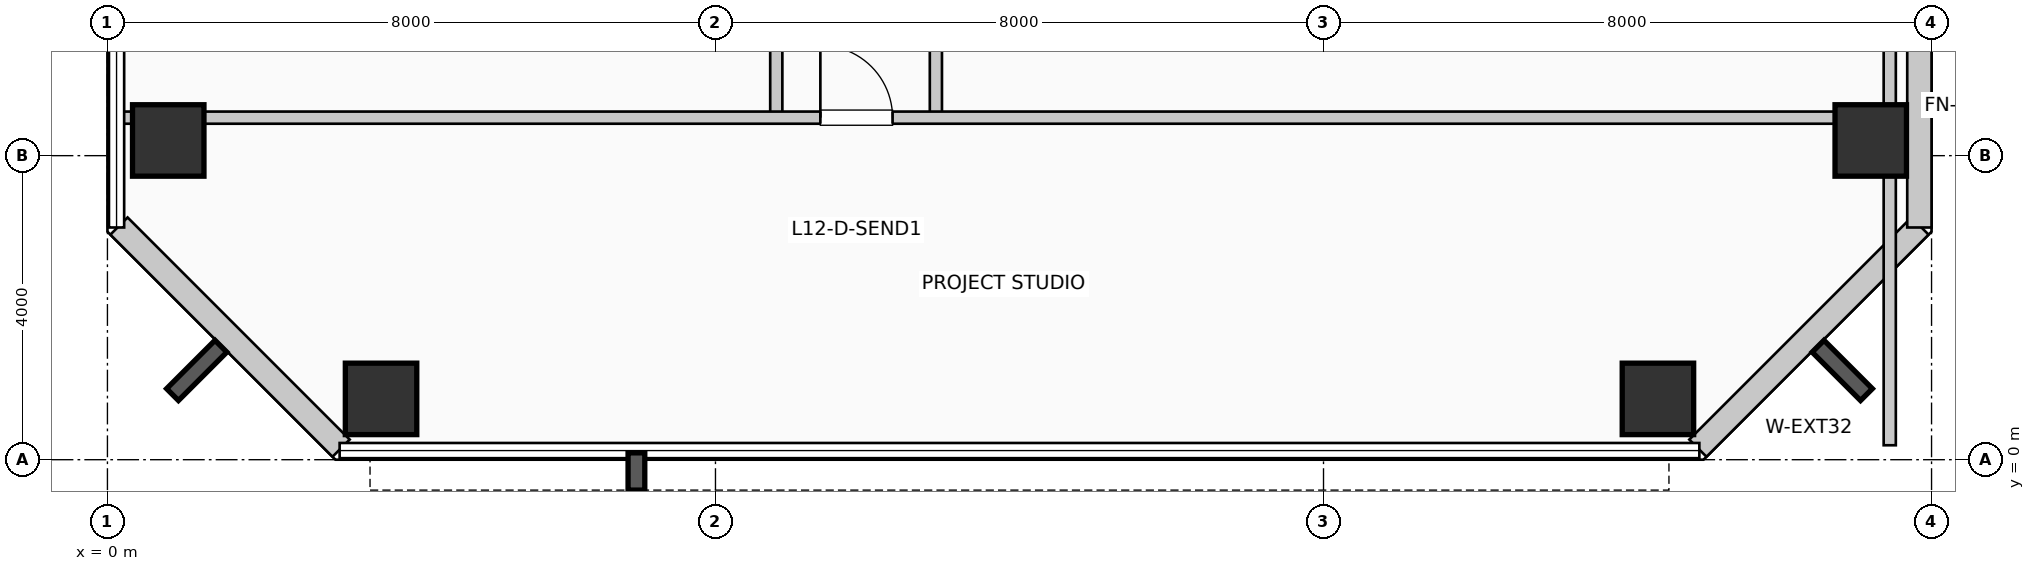
"""IFC4 building model, lengths in metres.
Left out: names, types, materials, properties, quantities, classifications, styles, units other than length and angle.
Written with IfcOpenShell. Run it as: python <this file> out.ifc"""

import sys

from ifc_helpers import new_model, si_unit, direction, frame, frame_2d, origin, origin_2d, place, context, subcontext, project, spatial, rectangle, extrude, element, fill, save


model = new_model("IFC4")
c1 = context("Model", 3, precision=1e-05, world=origin(), true_north=direction((0.0, 1.0)))
c2 = subcontext(c1, "Body", "Model", "MODEL_VIEW")
j1 = project(units=[si_unit("LENGTHUNIT", "METRE"), si_unit("PLANEANGLEUNIT", "RADIAN")], contexts=[c1])
p1 = place(None, origin())
s1 = spatial("IfcSite", under=j1, at=p1, CompositionType="ELEMENT")
p2 = place(p1, origin())
s2 = spatial("IfcBuilding", under=s1, at=p2, CompositionType="ELEMENT")
p3 = place(p2, frame((0.0, 0.0, 54.12)))
s3 = spatial("IfcBuildingStorey", under=s2, at=p3, CompositionType="ELEMENT", Elevation=54.12)
for number, where, z_axis, x_axis in (
    (1, (0.8, 4.2, 0.0), (0.0, 0.0, 1.0), (1.0, 0.0, 0.0)),
    (2, (3.6, 0.8, 0.0), (0.0, 0.0, 1.0), (1.0, 0.0, 0.0)),
    (3, (20.4, 0.8, 0.0), (0.0, 0.0, 1.0), (1.0, 0.0, 0.0)),
    (4, (23.2, 4.2, 0.0), (0.0, 0.0, 1.0), (1.0, 0.0, 0.0)),
):
    element("IfcColumn", number, at=place(p3, frame(where, z_axis=z_axis, x_axis=x_axis)), inside=s3, PredefinedType="COLUMN", context=c2, shape_type="SweptSolid", body=[
        extrude(rectangle(XDim=0.94, YDim=0.94, at=origin_2d()), origin(), (0.0, 0.0, 1.0), 3.96),
    ])
p4 = place(p3, frame((20.926, 0.152, 0.0), z_axis=(0.0, 0.0, 1.0), x_axis=(0.707106781187, 0.707106781187, 0.0)))
e5 = element("IfcWall", 5, at=p4, inside=s3, PredefinedType="SOLIDWALL", context=c2, shape_type="SweptSolid", body=[
    extrude(rectangle(XDim=4.133, YDim=0.32, at=frame_2d((2.066, 0.0))), origin(), (0.0, 0.0, 1.0), 3.71),
])
p5 = place(p3, frame((23.84, 3.055, 0.0), z_axis=(0.0, 0.0, 1.0), x_axis=(0.0, 1.0, 0.0)))
e6 = element("IfcWall", 6, at=p5, inside=s3, PredefinedType="SOLIDWALL", context=c2, shape_type="SweptSolid", body=[
    extrude(rectangle(XDim=12.89, YDim=0.32, at=frame_2d((6.445, 0.0))), origin(), (0.0, 0.0, 1.0), 3.71),
])
p6 = place(p3, frame((0.152, 3.074, 0.0), z_axis=(0.0, 0.0, 1.0), x_axis=(0.707106781187, -0.707106781187, 0.0)))
e7 = element("IfcWall", 7, at=p6, inside=s3, PredefinedType="SOLIDWALL", context=c2, shape_type="SweptSolid", body=[
    extrude(rectangle(XDim=4.133, YDim=0.32, at=frame_2d((2.066, 0.0))), origin(), (0.0, 0.0, 1.0), 3.71),
])
p7 = place(p3, frame((8.8, 4.5, 0.0), z_axis=(0.0, 0.0, 1.0), x_axis=(0.0, 1.0, 0.0)))
e8 = element("IfcWall", 8, at=p7, inside=s3, PredefinedType="PARTITIONING", context=c2, shape_type="SweptSolid", body=[
    extrude(rectangle(XDim=24.9, YDim=0.16, at=frame_2d((12.45, 0.0))), origin(), (0.0, 0.0, 1.0), 3.71),
])
p8 = place(p7, frame((3.587, 0.0, 0.0), z_axis=(0.0, 0.0, 1.0), x_axis=(-1.0, 0.0, 0.0)))
e9 = element("IfcOpeningElement", 9, at=p8, cuts=e8, PredefinedType="OPENING", context=c2, shape_type="SweptSolid", body=[
    extrude(rectangle(XDim=0.95, YDim=2.15, at=frame_2d((0.475, 1.075))), frame((0.0, 0.09, 0.0), z_axis=(0.0, -1.0, 0.0), x_axis=(1.0, 0.0, 0.0)), (0.0, 0.0, 1.0), 0.18),
])
p9 = place(p7, frame((10.311, 0.0, 0.0), z_axis=(0.0, 0.0, 1.0), x_axis=(-1.0, 0.0, 0.0)))
e10 = element("IfcOpeningElement", 10, at=p9, cuts=e8, PredefinedType="OPENING", context=c2, shape_type="SweptSolid", body=[
    extrude(rectangle(XDim=0.95, YDim=2.15, at=frame_2d((0.475, 1.075))), frame((0.0, 0.09, 0.0), z_axis=(0.0, -1.0, 0.0), x_axis=(1.0, 0.0, 0.0)), (0.0, 0.0, 1.0), 0.18),
])
p10 = place(p7, frame((17.158, 0.0, 0.0), z_axis=(0.0, 0.0, 1.0), x_axis=(-1.0, 0.0, 0.0)))
e11 = element("IfcOpeningElement", 11, at=p10, cuts=e8, PredefinedType="OPENING", context=c2, shape_type="SweptSolid", body=[
    extrude(rectangle(XDim=0.95, YDim=2.15, at=frame_2d((0.475, 1.075))), frame((0.0, 0.09, 0.0), z_axis=(0.0, -1.0, 0.0), x_axis=(1.0, 0.0, 0.0)), (0.0, 0.0, 1.0), 0.18),
])
p11 = place(p7, frame((22.885, 0.0, 0.0), z_axis=(0.0, 0.0, 1.0), x_axis=(-1.0, 0.0, 0.0)))
e12 = element("IfcOpeningElement", 12, at=p11, cuts=e8, PredefinedType="OPENING", context=c2, shape_type="SweptSolid", body=[
    extrude(rectangle(XDim=0.95, YDim=2.15, at=frame_2d((0.475, 1.075))), frame((0.0, 0.09, 0.0), z_axis=(0.0, -1.0, 0.0), x_axis=(1.0, 0.0, 0.0)), (0.0, 0.0, 1.0), 0.18),
])
p12 = place(p3, frame((10.9, 4.5, 0.0), z_axis=(0.0, 0.0, 1.0), x_axis=(0.0, 1.0, 0.0)))
e13 = element("IfcWall", 13, at=p12, inside=s3, PredefinedType="PARTITIONING", context=c2, shape_type="SweptSolid", body=[
    extrude(rectangle(XDim=24.9, YDim=0.16, at=frame_2d((12.45, 0.0))), origin(), (0.0, 0.0, 1.0), 3.71),
])
p13 = place(p12, frame((3.883, 0.0, 0.0)))
e14 = element("IfcOpeningElement", 14, at=p13, cuts=e13, PredefinedType="OPENING", context=c2, shape_type="SweptSolid", body=[
    extrude(rectangle(XDim=0.95, YDim=2.15, at=frame_2d((0.475, 1.075))), frame((0.0, 0.09, 0.0), z_axis=(0.0, -1.0, 0.0), x_axis=(1.0, 0.0, 0.0)), (0.0, 0.0, 1.0), 0.18),
])
p14 = place(p12, frame((12.097, 0.0, 0.0)))
e15 = element("IfcOpeningElement", 15, at=p14, cuts=e13, PredefinedType="OPENING", context=c2, shape_type="SweptSolid", body=[
    extrude(rectangle(XDim=0.95, YDim=2.15, at=frame_2d((0.475, 1.075))), frame((0.0, 0.09, 0.0), z_axis=(0.0, -1.0, 0.0), x_axis=(1.0, 0.0, 0.0)), (0.0, 0.0, 1.0), 0.18),
])
p15 = place(p12, frame((20.69, 0.0, 0.0)))
e16 = element("IfcOpeningElement", 16, at=p15, cuts=e13, PredefinedType="OPENING", context=c2, shape_type="SweptSolid", body=[
    extrude(rectangle(XDim=0.95, YDim=2.15, at=frame_2d((0.475, 1.075))), frame((0.0, 0.09, 0.0), z_axis=(0.0, -1.0, 0.0), x_axis=(1.0, 0.0, 0.0)), (0.0, 0.0, 1.0), 0.18),
])
p16 = place(p3, frame((0.19, 4.5, 0.0), z_axis=(0.0, 0.0, 1.0), x_axis=(1.0, 0.0, 0.0)))
e17 = element("IfcWall", 17, at=p16, inside=s3, PredefinedType="PARTITIONING", context=c2, shape_type="SweptSolid", body=[
    extrude(rectangle(XDim=23.26, YDim=0.16, at=frame_2d((11.63, 0.0))), origin(), (0.0, 0.0, 1.0), 2.995),
])
p17 = place(p16, frame((9.19, 0.0, 0.0)))
e18 = element("IfcOpeningElement", 18, at=p17, cuts=e17, PredefinedType="OPENING", context=c2, shape_type="SweptSolid", body=[
    extrude(rectangle(XDim=0.95, YDim=2.15, at=frame_2d((0.475, 1.075))), frame((0.0, 0.09, 0.0), z_axis=(0.0, -1.0, 0.0), x_axis=(1.0, 0.0, 0.0)), (0.0, 0.0, 1.0), 0.18),
])
p18 = place(p3, frame((23.45, 0.19, 0.0), z_axis=(0.0, 0.0, 1.0), x_axis=(0.0, 1.0, 0.0)))
e19 = element("IfcWall", 19, at=p18, inside=s3, PredefinedType="PARTITIONING", context=c2, shape_type="SweptSolid", body=[
    extrude(rectangle(XDim=29.21, YDim=0.16, at=frame_2d((14.605, 0.0))), origin(), (0.0, 0.0, 1.0), 2.995),
])
p19 = place(p17, origin())
e20 = element("IfcDoor", 20, at=p19, inside=s3, OperationType="SINGLE_SWING_LEFT", PredefinedType="DOOR", context=c2, shape_type="SweptSolid", body=[
    extrude(rectangle(XDim=0.95, YDim=2.15, at=frame_2d((0.475, 1.075))), frame((0.0, 0.025, 0.0), z_axis=(0.0, -1.0, 0.0), x_axis=(1.0, 0.0, 0.0)), (0.0, 0.0, 1.0), 0.05),
])
fill(e18, e20)
save(model, sys.argv[1])
